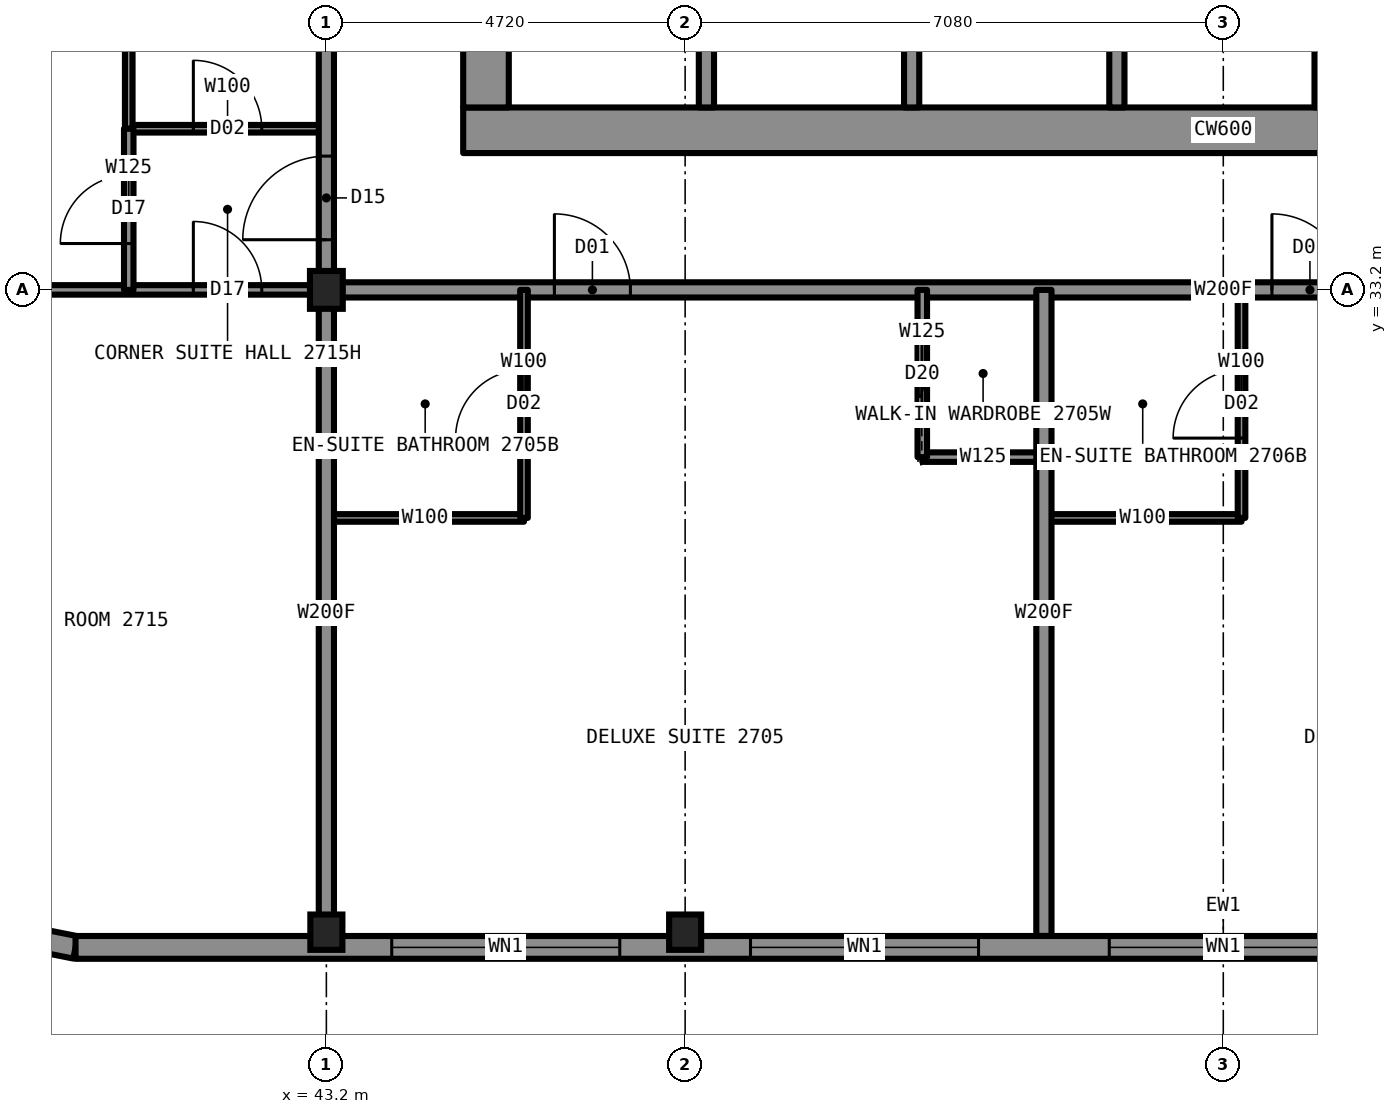
"""IFC4 building model, lengths in metres.
Left out: names, types, materials, properties, quantities, classifications, styles, units other than length and angle.
Written with IfcOpenShell. Run it as: python <this file> out.ifc"""

import sys

from ifc_helpers import new_model, si_unit, direction, frame, frame_2d, origin, origin_2d, place, context, subcontext, project, spatial, rectangle, i_section, extrude, element, fill, save


model = new_model("IFC4")
c1 = context("Model", 3, precision=1e-05, world=origin(), true_north=direction((0.0, 1.0)))
c2 = subcontext(c1, "Body", "Model", "MODEL_VIEW")
j1 = project(units=[si_unit("LENGTHUNIT", "METRE"), si_unit("PLANEANGLEUNIT", "RADIAN")], contexts=[c1])
p1 = place(None, origin())
s1 = spatial("IfcSite", under=j1, at=p1, CompositionType="ELEMENT")
p2 = place(p1, origin())
s2 = spatial("IfcBuilding", under=s1, at=p2, CompositionType="ELEMENT")
p3 = place(p2, frame((0.0, 0.0, 103.9)))
s3 = spatial("IfcBuildingStorey", under=s2, at=p3, CompositionType="ELEMENT", Elevation=103.9)
for number, where, z_axis, x_axis in (
    (1, (43.2, 24.75, 0.0), (0.0, 0.0, 1.0), (1.0, 0.0, 0.0)),
    (2, (47.92, 24.75, 0.0), (0.0, 0.0, 1.0), (1.0, 0.0, 0.0)),
):
    element("IfcColumn", number, at=place(p3, frame(where, z_axis=z_axis, x_axis=x_axis)), inside=s3, PredefinedType="COLUMN", context=c2, shape_type="SweptSolid", body=[
        extrude(i_section(OverallWidth=0.422, OverallDepth=0.465, WebThickness=0.045, FlangeThickness=0.073, at=origin_2d()), origin(), (0.0, 0.0, 1.0), 3.5),
    ])
p4 = place(p3, frame((43.2, 33.2, 0.0), z_axis=(0.0, 0.0, 1.0), x_axis=(1.0, 0.0, 0.0)))
e3 = element("IfcColumn", 3, at=p4, inside=s3, PredefinedType="COLUMN", context=c2, shape_type="SweptSolid", body=[
    extrude(i_section(OverallWidth=0.432, OverallDepth=0.498, WebThickness=0.056, FlangeThickness=0.089, at=origin_2d()), origin(), (0.0, 0.0, 1.0), 3.5),
])
p5 = place(p3, frame((45.0, 35.3, 0.0), z_axis=(0.0, 0.0, 1.0), x_axis=(1.0, 0.0, 0.0)))
e4 = element("IfcWall", 4, at=p5, inside=s3, PredefinedType="SHEAR", context=c2, shape_type="SweptSolid", body=[
    extrude(rectangle(XDim=20.0, YDim=0.6, at=frame_2d((10.0, 0.0))), origin(), (0.0, 0.0, 1.0), 3.5),
])
p6 = place(p3, frame((45.3, 35.6, 0.0), z_axis=(0.0, 0.0, 1.0), x_axis=(0.0, 1.0, 0.0)))
e5 = element("IfcWall", 5, at=p6, inside=s3, PredefinedType="SHEAR", context=c2, shape_type="SweptSolid", body=[
    extrude(rectangle(XDim=18.8, YDim=0.6, at=frame_2d((9.4, 0.0))), origin(), (0.0, 0.0, 1.0), 3.5),
])
p7 = place(p6, frame((13.4, 0.0, 0.0)))
e6 = element("IfcOpeningElement", 6, at=p7, cuts=e5, PredefinedType="OPENING", context=c2, shape_type="SweptSolid", body=[
    extrude(rectangle(XDim=1.8, YDim=2.2, at=frame_2d((0.9, 1.1))), frame((0.0, 0.31, 0.0), z_axis=(0.0, -1.0, 0.0), x_axis=(1.0, 0.0, 0.0)), (0.0, 0.0, 1.0), 0.62),
])
p8 = place(p6, frame((3.6, 0.0, 0.0)))
e7 = element("IfcOpeningElement", 7, at=p8, cuts=e5, PredefinedType="OPENING", context=c2, shape_type="SweptSolid", body=[
    extrude(rectangle(XDim=1.8, YDim=2.2, at=frame_2d((0.9, 1.1))), frame((0.0, 0.31, 0.0), z_axis=(0.0, -1.0, 0.0), x_axis=(1.0, 0.0, 0.0)), (0.0, 0.0, 1.0), 0.62),
])
p9 = place(p6, frame((6.4, 0.0, 0.0)))
e8 = element("IfcOpeningElement", 8, at=p9, cuts=e5, PredefinedType="OPENING", context=c2, shape_type="SweptSolid", body=[
    extrude(rectangle(XDim=1.2, YDim=2.2, at=frame_2d((0.6, 1.1))), frame((0.0, 0.31, 0.0), z_axis=(0.0, -1.0, 0.0), x_axis=(1.0, 0.0, 0.0)), (0.0, 0.0, 1.0), 0.62),
])
p10 = place(p3, frame((43.2, 33.2, 0.0), z_axis=(0.0, 0.0, 1.0), x_axis=(1.0, 0.0, 0.0)))
e9 = element("IfcWall", 9, at=p10, inside=s3, PredefinedType="PARTITIONING", context=c2, shape_type="SweptSolid", body=[
    extrude(rectangle(XDim=23.6, YDim=0.2, at=frame_2d((11.8, 0.0))), origin(), (0.0, 0.0, 1.0), 3.33),
])
p11 = place(p10, frame((3.0, 0.0, 0.0)))
e10 = element("IfcOpeningElement", 10, at=p11, cuts=e9, PredefinedType="OPENING", context=c2, shape_type="SweptSolid", body=[
    extrude(rectangle(XDim=1.0, YDim=2.2, at=frame_2d((0.5, 1.1))), frame((0.0, 0.11, 0.0), z_axis=(0.0, -1.0, 0.0), x_axis=(1.0, 0.0, 0.0)), (0.0, 0.0, 1.0), 0.22),
])
p12 = place(p10, frame((12.44, 0.0, 0.0)))
e11 = element("IfcOpeningElement", 11, at=p12, cuts=e9, PredefinedType="OPENING", context=c2, shape_type="SweptSolid", body=[
    extrude(rectangle(XDim=1.0, YDim=2.2, at=frame_2d((0.5, 1.1))), frame((0.0, 0.11, 0.0), z_axis=(0.0, -1.0, 0.0), x_axis=(1.0, 0.0, 0.0)), (0.0, 0.0, 1.0), 0.22),
])
p13 = place(p10, frame((21.43, 0.0, 0.0)))
e12 = element("IfcOpeningElement", 12, at=p13, cuts=e9, PredefinedType="OPENING", context=c2, shape_type="SweptSolid", body=[
    extrude(rectangle(XDim=1.0, YDim=2.2, at=frame_2d((0.5, 1.1))), frame((0.0, 0.11, 0.0), z_axis=(0.0, -1.0, 0.0), x_axis=(1.0, 0.0, 0.0)), (0.0, 0.0, 1.0), 0.22),
])
p14 = place(p3, frame((34.7, 33.2, 0.0), z_axis=(0.0, 0.0, 1.0), x_axis=(1.0, 0.0, 0.0)))
e13 = element("IfcWall", 13, at=p14, inside=s3, PredefinedType="PARTITIONING", context=c2, shape_type="SweptSolid", body=[
    extrude(rectangle(XDim=8.5, YDim=0.125, at=frame_2d((4.25, 0.0))), origin(), (0.0, 0.0, 1.0), 2.573),
])
p15 = place(p14, frame((6.75, 0.0, 0.0)))
e14 = element("IfcOpeningElement", 14, at=p15, cuts=e13, PredefinedType="OPENING", context=c2, shape_type="SweptSolid", body=[
    extrude(rectangle(XDim=0.9, YDim=2.2, at=frame_2d((0.45, 1.1))), frame((0.0, 0.073, 0.0), z_axis=(0.0, -1.0, 0.0), x_axis=(1.0, 0.0, 0.0)), (0.0, 0.0, 1.0), 0.145),
])
p16 = place(p3, frame((51.04, 31.0, 0.0), z_axis=(0.0, 0.0, 1.0), x_axis=(1.0, 0.0, 0.0)))
e15 = element("IfcWall", 15, at=p16, inside=s3, PredefinedType="PARTITIONING", context=c2, shape_type="SweptSolid", body=[
    extrude(rectangle(XDim=1.6, YDim=0.125, at=frame_2d((0.8, 0.0))), origin(), (0.0, 0.0, 1.0), 3.33),
])
for number, where, z_axis, x_axis in (
    (16, (43.2, 30.2, 0.0), (0.0, 0.0, 1.0), (1.0, 0.0, 0.0)),
    (17, (52.64, 30.2, 0.0), (0.0, 0.0, 1.0), (1.0, 0.0, 0.0)),
):
    element("IfcWall", number, at=place(p3, frame(where, z_axis=z_axis, x_axis=x_axis)), inside=s3, PredefinedType="PARTITIONING", context=c2, shape_type="SweptSolid", body=[
        extrude(rectangle(XDim=2.6, YDim=0.1, at=frame_2d((1.3, 0.0))), origin(), (0.0, 0.0, 1.0), 3.33),
    ])
p17 = place(p3, frame((40.6, 35.32, 0.0), z_axis=(0.0, 0.0, 1.0), x_axis=(1.0, 0.0, 0.0)))
e18 = element("IfcWall", 18, at=p17, inside=s3, PredefinedType="PARTITIONING", context=c2, shape_type="SweptSolid", body=[
    extrude(rectangle(XDim=2.6, YDim=0.1, at=frame_2d((1.3, 0.0))), origin(), (0.0, 0.0, 1.0), 3.33),
])
p18 = place(p17, frame((0.85, 0.0, 0.0)))
e19 = element("IfcOpeningElement", 19, at=p18, cuts=e18, PredefinedType="OPENING", context=c2, shape_type="SweptSolid", body=[
    extrude(rectangle(XDim=0.9, YDim=2.1, at=frame_2d((0.45, 1.05))), frame((0.0, 0.06, 0.0), z_axis=(0.0, -1.0, 0.0), x_axis=(1.0, 0.0, 0.0)), (0.0, 0.0, 1.0), 0.12),
])
p19 = place(p3, frame((43.2, 33.2, 0.0), z_axis=(0.0, 0.0, 1.0), x_axis=(0.0, 1.0, 0.0)))
e20 = element("IfcWall", 20, at=p19, inside=s3, PredefinedType="PARTITIONING", context=c2, shape_type="SweptSolid", body=[
    extrude(rectangle(XDim=23.58, YDim=0.2, at=frame_2d((11.79, 0.0))), origin(), (0.0, 0.0, 1.0), 3.33),
])
p20 = place(p19, frame((7.72, 0.0, 0.0)))
e21 = element("IfcOpeningElement", 21, at=p20, cuts=e20, PredefinedType="OPENING", context=c2, shape_type="SweptSolid", body=[
    extrude(rectangle(XDim=1.0, YDim=2.2, at=frame_2d((0.5, 1.1))), frame((0.0, 0.11, 0.0), z_axis=(0.0, -1.0, 0.0), x_axis=(1.0, 0.0, 0.0)), (0.0, 0.0, 1.0), 0.22),
])
p21 = place(p19, frame((14.56, 0.0, 0.0)))
e22 = element("IfcOpeningElement", 22, at=p21, cuts=e20, PredefinedType="OPENING", context=c2, shape_type="SweptSolid", body=[
    extrude(rectangle(XDim=1.0, YDim=2.2, at=frame_2d((0.5, 1.1))), frame((0.0, 0.11, 0.0), z_axis=(0.0, -1.0, 0.0), x_axis=(1.0, 0.0, 0.0)), (0.0, 0.0, 1.0), 0.22),
])
p22 = place(p19, frame((21.84, 0.0, 0.0)))
e23 = element("IfcOpeningElement", 23, at=p22, cuts=e20, PredefinedType="OPENING", context=c2, shape_type="SweptSolid", body=[
    extrude(rectangle(XDim=1.1, YDim=2.2, at=frame_2d((0.55, 1.1))), frame((0.0, 0.11, 0.0), z_axis=(0.0, -1.0, 0.0), x_axis=(1.0, 0.0, 0.0)), (0.0, 0.0, 1.0), 0.22),
])
p23 = place(p19, frame((0.66, 0.0, 0.0)))
e24 = element("IfcOpeningElement", 24, at=p23, cuts=e20, PredefinedType="OPENING", context=c2, shape_type="SweptSolid", body=[
    extrude(rectangle(XDim=1.1, YDim=2.2, at=frame_2d((0.55, 1.1))), frame((0.0, 0.11, 0.0), z_axis=(0.0, -1.0, 0.0), x_axis=(1.0, 0.0, 0.0)), (0.0, 0.0, 1.0), 0.22),
])
p24 = place(p3, frame((43.2, 24.7, 0.0), z_axis=(0.0, 0.0, 1.0), x_axis=(0.0, 1.0, 0.0)))
e25 = element("IfcWall", 25, at=p24, inside=s3, PredefinedType="PARTITIONING", context=c2, shape_type="SweptSolid", body=[
    extrude(rectangle(XDim=8.5, YDim=0.2, at=frame_2d((4.25, 0.0))), origin(), (0.0, 0.0, 1.0), 2.573),
])
p25 = place(p3, frame((40.6, 35.32, 0.0), z_axis=(0.0, 0.0, 1.0), x_axis=(0.0, 1.0, 0.0)))
e26 = element("IfcWall", 26, at=p25, inside=s3, PredefinedType="PARTITIONING", context=c2, shape_type="SweptSolid", body=[
    extrude(rectangle(XDim=2.6, YDim=0.1, at=frame_2d((1.3, 0.0))), origin(), (0.0, 0.0, 1.0), 3.33),
])
p26 = place(p3, frame((40.6, 33.2, 0.0), z_axis=(0.0, 0.0, 1.0), x_axis=(0.0, 1.0, 0.0)))
e27 = element("IfcWall", 27, at=p26, inside=s3, PredefinedType="PARTITIONING", context=c2, shape_type="SweptSolid", body=[
    extrude(rectangle(XDim=2.12, YDim=0.125, at=frame_2d((1.06, 0.0))), origin(), (0.0, 0.0, 1.0), 3.33),
])
p27 = place(p26, frame((0.61, 0.0, 0.0)))
e28 = element("IfcOpeningElement", 28, at=p27, cuts=e27, PredefinedType="OPENING", context=c2, shape_type="SweptSolid", body=[
    extrude(rectangle(XDim=0.9, YDim=2.2, at=frame_2d((0.45, 1.1))), frame((0.0, 0.073, 0.0), z_axis=(0.0, -1.0, 0.0), x_axis=(1.0, 0.0, 0.0)), (0.0, 0.0, 1.0), 0.145),
])
p28 = place(p3, frame((52.64, 24.7, 0.0), z_axis=(0.0, 0.0, 1.0), x_axis=(0.0, 1.0, 0.0)))
e29 = element("IfcWall", 29, at=p28, inside=s3, PredefinedType="PARTITIONING", context=c2, shape_type="SweptSolid", body=[
    extrude(rectangle(XDim=8.5, YDim=0.2, at=frame_2d((4.25, 0.0))), origin(), (0.0, 0.0, 1.0), 3.33),
])
p29 = place(p3, frame((51.04, 31.0, 0.0), z_axis=(0.0, 0.0, 1.0), x_axis=(0.0, 1.0, 0.0)))
e30 = element("IfcWall", 30, at=p29, inside=s3, PredefinedType="PARTITIONING", context=c2, shape_type="SweptSolid", body=[
    extrude(rectangle(XDim=2.2, YDim=0.125, at=frame_2d((1.1, 0.0))), origin(), (0.0, 0.0, 1.0), 3.33),
])
p30 = place(p29, frame((0.7, 0.0, 0.0)))
e31 = element("IfcOpeningElement", 31, at=p30, cuts=e30, PredefinedType="OPENING", context=c2, shape_type="SweptSolid", body=[
    extrude(rectangle(XDim=0.8, YDim=2.1, at=frame_2d((0.4, 1.05))), frame((0.0, 0.073, 0.0), z_axis=(0.0, -1.0, 0.0), x_axis=(1.0, 0.0, 0.0)), (0.0, 0.0, 1.0), 0.145),
])
p31 = place(p3, frame((45.8, 30.2, 0.0), z_axis=(0.0, 0.0, 1.0), x_axis=(0.0, 1.0, 0.0)))
e32 = element("IfcWall", 32, at=p31, inside=s3, PredefinedType="PARTITIONING", context=c2, shape_type="SweptSolid", body=[
    extrude(rectangle(XDim=3.0, YDim=0.1, at=frame_2d((1.5, 0.0))), origin(), (0.0, 0.0, 1.0), 3.33),
])
p32 = place(p31, frame((1.05, 0.0, 0.0)))
e33 = element("IfcOpeningElement", 33, at=p32, cuts=e32, PredefinedType="OPENING", context=c2, shape_type="SweptSolid", body=[
    extrude(rectangle(XDim=0.9, YDim=2.1, at=frame_2d((0.45, 1.05))), frame((0.0, 0.06, 0.0), z_axis=(0.0, -1.0, 0.0), x_axis=(1.0, 0.0, 0.0)), (0.0, 0.0, 1.0), 0.12),
])
p33 = place(p3, frame((55.24, 30.2, 0.0), z_axis=(0.0, 0.0, 1.0), x_axis=(0.0, 1.0, 0.0)))
e34 = element("IfcWall", 34, at=p33, inside=s3, PredefinedType="PARTITIONING", context=c2, shape_type="SweptSolid", body=[
    extrude(rectangle(XDim=3.0, YDim=0.1, at=frame_2d((1.5, 0.0))), origin(), (0.0, 0.0, 1.0), 3.33),
])
p34 = place(p33, frame((1.05, 0.0, 0.0)))
e35 = element("IfcOpeningElement", 35, at=p34, cuts=e34, PredefinedType="OPENING", context=c2, shape_type="SweptSolid", body=[
    extrude(rectangle(XDim=0.9, YDim=2.1, at=frame_2d((0.45, 1.05))), frame((0.0, 0.06, 0.0), z_axis=(0.0, -1.0, 0.0), x_axis=(1.0, 0.0, 0.0)), (0.0, 0.0, 1.0), 0.12),
])
p35 = place(p3, frame((37.853, 24.957, 0.0), z_axis=(0.0, 0.0, 1.0), x_axis=(0.980787050784, -0.195081421501, 0.0)))
e36 = element("IfcWall", 36, at=p35, inside=s3, PredefinedType="SOLIDWALL", context=c2, shape_type="SweptSolid", body=[
    extrude(rectangle(XDim=2.087, YDim=0.3, at=frame_2d((1.044, 0.0))), origin(), (0.0, 0.0, 1.0), 3.33),
])
p36 = place(p35, frame((0.444, 0.0, 0.5)))
e37 = element("IfcOpeningElement", 37, at=p36, cuts=e36, PredefinedType="OPENING", context=c2, shape_type="SweptSolid", body=[
    extrude(rectangle(XDim=1.2, YDim=2.0, at=frame_2d((0.6, 1.0))), frame((0.0, 0.16, 0.0), z_axis=(0.0, -1.0, 0.0), x_axis=(1.0, 0.0, 0.0)), (0.0, 0.0, 1.0), 0.32),
])
p37 = place(p3, frame((39.9, 24.55, 0.0), z_axis=(0.0, 0.0, 1.0), x_axis=(1.0, 0.0, 0.0)))
e38 = element("IfcWall", 38, at=p37, inside=s3, PredefinedType="SOLIDWALL", context=c2, shape_type="SweptSolid", body=[
    extrude(rectangle(XDim=30.2, YDim=0.3, at=frame_2d((15.1, 0.0))), origin(), (0.0, 0.0, 1.0), 2.83),
])
p38 = place(p37, frame((4.16, 0.0, 0.5)))
e39 = element("IfcOpeningElement", 39, at=p38, cuts=e38, PredefinedType="OPENING", context=c2, shape_type="SweptSolid", body=[
    extrude(rectangle(XDim=3.0, YDim=2.0, at=frame_2d((1.5, 1.0))), frame((0.0, 0.16, 0.0), z_axis=(0.0, -1.0, 0.0), x_axis=(1.0, 0.0, 0.0)), (0.0, 0.0, 1.0), 0.32),
])
p39 = place(p37, frame((8.88, 0.0, 0.5)))
e40 = element("IfcOpeningElement", 40, at=p39, cuts=e38, PredefinedType="OPENING", context=c2, shape_type="SweptSolid", body=[
    extrude(rectangle(XDim=3.0, YDim=2.0, at=frame_2d((1.5, 1.0))), frame((0.0, 0.16, 0.0), z_axis=(0.0, -1.0, 0.0), x_axis=(1.0, 0.0, 0.0)), (0.0, 0.0, 1.0), 0.32),
])
p40 = place(p37, frame((13.6, 0.0, 0.5)))
e41 = element("IfcOpeningElement", 41, at=p40, cuts=e38, PredefinedType="OPENING", context=c2, shape_type="SweptSolid", body=[
    extrude(rectangle(XDim=3.0, YDim=2.0, at=frame_2d((1.5, 1.0))), frame((0.0, 0.16, 0.0), z_axis=(0.0, -1.0, 0.0), x_axis=(1.0, 0.0, 0.0)), (0.0, 0.0, 1.0), 0.32),
])
p41 = place(p37, frame((18.32, 0.0, 0.5)))
e42 = element("IfcOpeningElement", 42, at=p41, cuts=e38, PredefinedType="OPENING", context=c2, shape_type="SweptSolid", body=[
    extrude(rectangle(XDim=3.0, YDim=2.0, at=frame_2d((1.5, 1.0))), frame((0.0, 0.16, 0.0), z_axis=(0.0, -1.0, 0.0), x_axis=(1.0, 0.0, 0.0)), (0.0, 0.0, 1.0), 0.32),
])
p42 = place(p37, frame((23.04, 0.0, 0.5)))
e43 = element("IfcOpeningElement", 43, at=p42, cuts=e38, PredefinedType="OPENING", context=c2, shape_type="SweptSolid", body=[
    extrude(rectangle(XDim=3.0, YDim=2.0, at=frame_2d((1.5, 1.0))), frame((0.0, 0.16, 0.0), z_axis=(0.0, -1.0, 0.0), x_axis=(1.0, 0.0, 0.0)), (0.0, 0.0, 1.0), 0.32),
])
for number, where, z_axis, x_axis in (
    (44, (48.2, 35.6, 0.0), (0.0, 0.0, 1.0), (0.0, 1.0, 0.0)),
    (45, (50.9, 35.6, 0.0), (0.0, 0.0, 1.0), (0.0, 1.0, 0.0)),
    (46, (53.6, 35.6, 0.0), (0.0, 0.0, 1.0), (0.0, 1.0, 0.0)),
    (47, (56.3, 35.6, 0.0), (0.0, 0.0, 1.0), (0.0, 1.0, 0.0)),
):
    element("IfcWall", number, at=place(p3, frame(where, z_axis=z_axis, x_axis=x_axis)), inside=s3, PredefinedType="PARTITIONING", context=c2, shape_type="SweptSolid", body=[
        extrude(rectangle(XDim=2.7, YDim=0.2, at=frame_2d((1.35, 0.0))), origin(), (0.0, 0.0, 1.0), 3.33),
    ])
p43 = place(p11, origin())
e48 = element("IfcDoor", 48, at=p43, inside=s3, OperationType="SINGLE_SWING_LEFT", PredefinedType="DOOR", context=c2, shape_type="SweptSolid", body=[
    extrude(rectangle(XDim=1.0, YDim=2.2, at=frame_2d((0.5, 1.1))), frame((0.0, 0.025, 0.0), z_axis=(0.0, -1.0, 0.0), x_axis=(1.0, 0.0, 0.0)), (0.0, 0.0, 1.0), 0.05),
])
fill(e10, e48)
p44 = place(p32, origin())
e49 = element("IfcDoor", 49, at=p44, inside=s3, OperationType="SINGLE_SWING_RIGHT", PredefinedType="DOOR", context=c2, shape_type="SweptSolid", body=[
    extrude(rectangle(XDim=0.9, YDim=2.1, at=frame_2d((0.45, 1.05))), frame((0.0, 0.025, 0.0), z_axis=(0.0, -1.0, 0.0), x_axis=(1.0, 0.0, 0.0)), (0.0, 0.0, 1.0), 0.05),
])
fill(e33, e49)
p45 = place(p30, origin())
e50 = element("IfcDoor", 50, at=p45, inside=s3, OperationType="SLIDING_TO_LEFT", PredefinedType="DOOR", context=c2, shape_type="SweptSolid", body=[
    extrude(rectangle(XDim=0.8, YDim=2.1, at=frame_2d((0.4, 1.05))), frame((0.0, 0.025, 0.0), z_axis=(0.0, -1.0, 0.0), x_axis=(1.0, 0.0, 0.0)), (0.0, 0.0, 1.0), 0.05),
])
fill(e31, e50)
p46 = place(p12, origin())
e51 = element("IfcDoor", 51, at=p46, inside=s3, OperationType="SINGLE_SWING_LEFT", PredefinedType="DOOR", context=c2, shape_type="SweptSolid", body=[
    extrude(rectangle(XDim=1.0, YDim=2.2, at=frame_2d((0.5, 1.1))), frame((0.0, 0.025, 0.0), z_axis=(0.0, -1.0, 0.0), x_axis=(1.0, 0.0, 0.0)), (0.0, 0.0, 1.0), 0.05),
])
fill(e11, e51)
p47 = place(p34, origin())
e52 = element("IfcDoor", 52, at=p47, inside=s3, OperationType="SINGLE_SWING_RIGHT", PredefinedType="DOOR", context=c2, shape_type="SweptSolid", body=[
    extrude(rectangle(XDim=0.9, YDim=2.1, at=frame_2d((0.45, 1.05))), frame((0.0, 0.025, 0.0), z_axis=(0.0, -1.0, 0.0), x_axis=(1.0, 0.0, 0.0)), (0.0, 0.0, 1.0), 0.05),
])
fill(e35, e52)
p48 = place(p15, origin())
e53 = element("IfcDoor", 53, at=p48, inside=s3, OperationType="SINGLE_SWING_LEFT", PredefinedType="DOOR", context=c2, shape_type="SweptSolid", body=[
    extrude(rectangle(XDim=0.9, YDim=2.2, at=frame_2d((0.45, 1.1))), frame((0.0, 0.025, 0.0), z_axis=(0.0, -1.0, 0.0), x_axis=(1.0, 0.0, 0.0)), (0.0, 0.0, 1.0), 0.05),
])
fill(e14, e53)
p49 = place(p18, origin())
e54 = element("IfcDoor", 54, at=p49, inside=s3, OperationType="SINGLE_SWING_RIGHT", PredefinedType="DOOR", context=c2, shape_type="SweptSolid", body=[
    extrude(rectangle(XDim=0.9, YDim=2.1, at=frame_2d((0.45, 1.05))), frame((0.0, 0.025, 0.0), z_axis=(0.0, -1.0, 0.0), x_axis=(1.0, 0.0, 0.0)), (0.0, 0.0, 1.0), 0.05),
])
fill(e19, e54)
p50 = place(p23, origin())
e55 = element("IfcDoor", 55, at=p50, inside=s3, OperationType="SINGLE_SWING_LEFT", PredefinedType="DOOR", context=c2, shape_type="SweptSolid", body=[
    extrude(rectangle(XDim=1.1, YDim=2.2, at=frame_2d((0.55, 1.1))), frame((0.0, 0.025, 0.0), z_axis=(0.0, -1.0, 0.0), x_axis=(1.0, 0.0, 0.0)), (0.0, 0.0, 1.0), 0.05),
])
fill(e24, e55)
p51 = place(p27, origin())
e56 = element("IfcDoor", 56, at=p51, inside=s3, OperationType="SINGLE_SWING_LEFT", PredefinedType="DOOR", context=c2, shape_type="SweptSolid", body=[
    extrude(rectangle(XDim=0.9, YDim=2.2, at=frame_2d((0.45, 1.1))), frame((0.0, 0.025, 0.0), z_axis=(0.0, -1.0, 0.0), x_axis=(1.0, 0.0, 0.0)), (0.0, 0.0, 1.0), 0.05),
])
fill(e28, e56)
p52 = place(p38, origin())
e57 = element("IfcWindow", 57, at=p52, inside=s3, PartitioningType="SINGLE_PANEL", PredefinedType="WINDOW", context=c2, shape_type="SweptSolid", body=[
    extrude(rectangle(XDim=3.0, YDim=2.0, at=frame_2d((1.5, 1.0))), frame((0.0, 0.03, 0.0), z_axis=(0.0, -1.0, 0.0), x_axis=(1.0, 0.0, 0.0)), (0.0, 0.0, 1.0), 0.06),
])
fill(e39, e57)
p53 = place(p39, origin())
e58 = element("IfcWindow", 58, at=p53, inside=s3, PartitioningType="SINGLE_PANEL", PredefinedType="WINDOW", context=c2, shape_type="SweptSolid", body=[
    extrude(rectangle(XDim=3.0, YDim=2.0, at=frame_2d((1.5, 1.0))), frame((0.0, 0.03, 0.0), z_axis=(0.0, -1.0, 0.0), x_axis=(1.0, 0.0, 0.0)), (0.0, 0.0, 1.0), 0.06),
])
fill(e40, e58)
p54 = place(p40, origin())
e59 = element("IfcWindow", 59, at=p54, inside=s3, PartitioningType="SINGLE_PANEL", PredefinedType="WINDOW", context=c2, shape_type="SweptSolid", body=[
    extrude(rectangle(XDim=3.0, YDim=2.0, at=frame_2d((1.5, 1.0))), frame((0.0, 0.03, 0.0), z_axis=(0.0, -1.0, 0.0), x_axis=(1.0, 0.0, 0.0)), (0.0, 0.0, 1.0), 0.06),
])
fill(e41, e59)
save(model, sys.argv[1])
